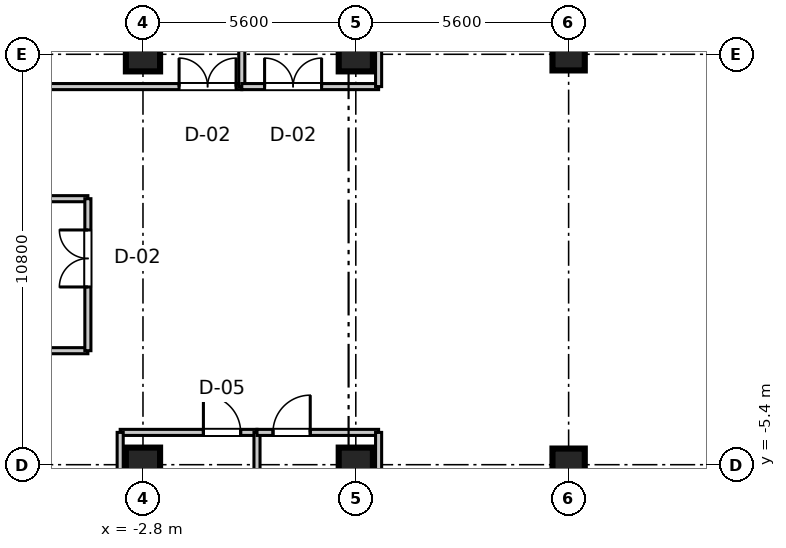
"""IFC4 building model, lengths in metres.
Left out: names, types, materials, properties, quantities, classifications, styles, units other than length and angle.
Written with IfcOpenShell. Run it as: python <this file> out.ifc"""

import sys

from ifc_helpers import new_model, si_unit, direction, frame, frame_2d, origin, origin_2d, place, context, subcontext, project, spatial, rectangle, extrude, source, transform, mapped, element, fill, save


model = new_model("IFC4")
c1 = context("Model", 3, precision=1e-05, world=origin(), true_north=direction((0.0, 1.0)))
c2 = subcontext(c1, "Body", "Model", "MODEL_VIEW")
j1 = project(units=[si_unit("LENGTHUNIT", "METRE"), si_unit("PLANEANGLEUNIT", "RADIAN")], contexts=[c1])
p1 = place(None, origin())
s1 = spatial("IfcSite", under=j1, at=p1, CompositionType="ELEMENT")
p2 = place(p1, origin())
s2 = spatial("IfcBuilding", under=s1, at=p2, CompositionType="ELEMENT")
p3 = place(p2, frame((0.0, 0.0, 343.05)))
s3 = spatial("IfcBuildingStorey", under=s2, at=p3, CompositionType="ELEMENT", Elevation=343.05)
m1 = source(origin(), c2, "Body", "SweptSolid", [
    extrude(rectangle(XDim=0.9, YDim=0.9, at=origin_2d()), origin(), (0.0, 0.0, 1.0), 4.455),
])
for number, where, z_axis, x_axis in (
    (1, (-2.8, -5.4, 0.0), (0.0, 0.0, 1.0), (1.0, 0.0, 0.0)),
    (2, (-2.8, 5.4, 0.0), (0.0, 0.0, 1.0), (1.0, 0.0, 0.0)),
    (3, (2.8, -5.4, 0.0), (0.0, 0.0, 1.0), (1.0, 0.0, 0.0)),
    (4, (2.8, 5.4, 0.0), (0.0, 0.0, 1.0), (1.0, 0.0, 0.0)),
):
    element("IfcColumn", number, at=place(p3, frame(where, z_axis=z_axis, x_axis=x_axis)), inside=s3, PredefinedType="COLUMN", context=c2, shape_type="MappedRepresentation", body=[
        mapped(m1, transform((0.0, 0.0, 0.0), scale=1.0)),
    ])
m2 = source(origin(), c2, "Body", "SweptSolid", [
    extrude(rectangle(XDim=0.85, YDim=0.85, at=origin_2d()), origin(), (0.0, 0.0, 1.0), 4.455),
])
for number, where, z_axis, x_axis in (
    (5, (8.4, -5.4, 0.0), (0.0, 0.0, 1.0), (1.0, 0.0, 0.0)),
    (6, (8.4, 5.4, 0.0), (0.0, 0.0, 1.0), (1.0, 0.0, 0.0)),
):
    element("IfcColumn", number, at=place(p3, frame(where, z_axis=z_axis, x_axis=x_axis)), inside=s3, PredefinedType="PILASTER", context=c2, shape_type="MappedRepresentation", body=[
        mapped(m2, transform((0.0, 0.0, 0.0), scale=1.0)),
    ])
m3 = source(origin(), c2, "Body", "SweptSolid", [
    extrude(rectangle(XDim=18.25, YDim=0.16, at=frame_2d((9.125, 0.0))), origin(), (0.0, 0.0, 1.0), 3.4),
])
for number, where, z_axis, x_axis in (
    (7, (-22.5, -2.4, 0.0), (0.0, 0.0, 1.0), (1.0, 0.0, 0.0)),
    (8, (-22.5, 1.6, 0.0), (0.0, 0.0, 1.0), (1.0, 0.0, 0.0)),
):
    element("IfcWall", number, at=place(p3, frame(where, z_axis=z_axis, x_axis=x_axis)), inside=s3, PredefinedType="PARTITIONING", context=c2, shape_type="MappedRepresentation", body=[
        mapped(m3, transform((0.0, 0.0, 0.0), scale=1.0)),
    ])
m4 = source(origin(), c2, "Body", "SweptSolid", [
    extrude(rectangle(XDim=4.0, YDim=0.16, at=frame_2d((2.0, 0.0))), origin(), (0.0, 0.0, 1.0), 3.4),
])
p4 = place(p3, frame((-4.25, -2.4, 0.0), z_axis=(0.0, 0.0, 1.0), x_axis=(0.0, 1.0, 0.0)))
e9 = element("IfcWall", 9, at=p4, inside=s3, PredefinedType="PARTITIONING", context=c2, shape_type="MappedRepresentation", body=[
    mapped(m4, transform((0.0, 0.0, 0.0), scale=1.0)),
])
p5 = place(p4, frame((1.677, 0.0, 0.0)))
e10 = element("IfcOpeningElement", 10, at=p5, cuts=e9, PredefinedType="OPENING", context=c2, shape_type="SweptSolid", body=[
    extrude(rectangle(XDim=1.5, YDim=2.15, at=frame_2d((0.75, 1.075))), frame((0.0, 0.09, 0.0), z_axis=(0.0, -1.0, 0.0), x_axis=(1.0, 0.0, 0.0)), (0.0, 0.0, 1.0), 0.18),
])
m5 = source(origin(), c2, "Body", "SweptSolid", [
    extrude(rectangle(XDim=22.3, YDim=0.16, at=frame_2d((11.15, 0.0))), origin(), (0.0, 0.0, 1.0), 3.4),
])
p6 = place(p3, frame((-22.5, 4.55, 0.0), z_axis=(0.0, 0.0, 1.0), x_axis=(1.0, 0.0, 0.0)))
e11 = element("IfcWall", 11, at=p6, inside=s3, PredefinedType="PARTITIONING", context=c2, shape_type="MappedRepresentation", body=[
    mapped(m5, transform((0.0, 0.0, 0.0), scale=1.0)),
])
p7 = place(p6, frame((20.65, 0.0, 0.0)))
e12 = element("IfcOpeningElement", 12, at=p7, cuts=e11, PredefinedType="OPENING", context=c2, shape_type="SweptSolid", body=[
    extrude(rectangle(XDim=1.5, YDim=2.15, at=frame_2d((0.75, 1.075))), frame((0.0, 0.09, 0.0), z_axis=(0.0, -1.0, 0.0), x_axis=(1.0, 0.0, 0.0)), (0.0, 0.0, 1.0), 0.18),
])
m6 = source(origin(), c2, "Body", "SweptSolid", [
    extrude(rectangle(XDim=17.95, YDim=0.16, at=frame_2d((8.975, 0.0))), origin(), (0.0, 0.0, 1.0), 3.4),
])
p8 = place(p3, frame((-0.2, 4.55, 0.0), z_axis=(0.0, 0.0, 1.0), x_axis=(0.0, 1.0, 0.0)))
e13 = element("IfcWall", 13, at=p8, inside=s3, PredefinedType="PARTITIONING", context=c2, shape_type="MappedRepresentation", body=[
    mapped(m6, transform((0.0, 0.0, 0.0), scale=1.0)),
])
m7 = source(origin(), c2, "Body", "SweptSolid", [
    extrude(rectangle(XDim=3.6, YDim=0.16, at=frame_2d((1.8, 0.0))), origin(), (0.0, 0.0, 1.0), 3.4),
])
p9 = place(p3, frame((-0.2, 4.55, 0.0), z_axis=(0.0, 0.0, 1.0), x_axis=(1.0, 0.0, 0.0)))
e14 = element("IfcWall", 14, at=p9, inside=s3, PredefinedType="PARTITIONING", context=c2, shape_type="MappedRepresentation", body=[
    mapped(m7, transform((0.0, 0.0, 0.0), scale=1.0)),
])
p10 = place(p9, frame((0.6, 0.0, 0.0)))
e15 = element("IfcOpeningElement", 15, at=p10, cuts=e14, PredefinedType="OPENING", context=c2, shape_type="SweptSolid", body=[
    extrude(rectangle(XDim=1.5, YDim=2.15, at=frame_2d((0.75, 1.075))), frame((0.0, 0.09, 0.0), z_axis=(0.0, -1.0, 0.0), x_axis=(1.0, 0.0, 0.0)), (0.0, 0.0, 1.0), 0.18),
])
p11 = place(p3, frame((3.4, 4.55, 0.0), z_axis=(0.0, 0.0, 1.0), x_axis=(0.0, 1.0, 0.0)))
e16 = element("IfcWall", 16, at=p11, inside=s3, PredefinedType="PARTITIONING", context=c2, shape_type="MappedRepresentation", body=[
    mapped(m6, transform((0.0, 0.0, 0.0), scale=1.0)),
])
p12 = place(p3, frame((-3.4, -4.55, 0.0), z_axis=(0.0, 0.0, 1.0), x_axis=(1.0, 0.0, 0.0)))
e17 = element("IfcWall", 17, at=p12, inside=s3, PredefinedType="PARTITIONING", context=c2, shape_type="MappedRepresentation", body=[
    mapped(m7, transform((0.0, 0.0, 0.0), scale=1.0)),
])
p13 = place(p12, frame((2.19, 0.0, 0.0)))
e18 = element("IfcOpeningElement", 18, at=p13, cuts=e17, PredefinedType="OPENING", context=c2, shape_type="SweptSolid", body=[
    extrude(rectangle(XDim=0.98, YDim=2.1, at=frame_2d((0.49, 1.05))), frame((0.0, 0.09, 0.0), z_axis=(0.0, -1.0, 0.0), x_axis=(1.0, 0.0, 0.0)), (0.0, 0.0, 1.0), 0.18),
])
m8 = source(origin(), c2, "Body", "SweptSolid", [
    extrude(rectangle(XDim=7.45, YDim=0.16, at=frame_2d((3.725, 0.0))), origin(), (0.0, 0.0, 1.0), 3.4),
])
for number, where, z_axis, x_axis in (
    (19, (-3.4, -12.0, 0.0), (0.0, 0.0, 1.0), (0.0, 1.0, 0.0)),
    (20, (0.2, -12.0, 0.0), (0.0, 0.0, 1.0), (0.0, 1.0, 0.0)),
):
    element("IfcWall", number, at=place(p3, frame(where, z_axis=z_axis, x_axis=x_axis)), inside=s3, PredefinedType="PARTITIONING", context=c2, shape_type="MappedRepresentation", body=[
        mapped(m8, transform((0.0, 0.0, 0.0), scale=1.0)),
    ])
m9 = source(origin(), c2, "Body", "SweptSolid", [
    extrude(rectangle(XDim=3.2, YDim=0.16, at=frame_2d((1.6, 0.0))), origin(), (0.0, 0.0, 1.0), 3.4),
])
p14 = place(p3, frame((0.2, -4.55, 0.0), z_axis=(0.0, 0.0, 1.0), x_axis=(1.0, 0.0, 0.0)))
e21 = element("IfcWall", 21, at=p14, inside=s3, PredefinedType="PARTITIONING", context=c2, shape_type="MappedRepresentation", body=[
    mapped(m9, transform((0.0, 0.0, 0.0), scale=1.0)),
])
p15 = place(p14, frame((0.421, 0.0, 0.0)))
e22 = element("IfcOpeningElement", 22, at=p15, cuts=e21, PredefinedType="OPENING", context=c2, shape_type="SweptSolid", body=[
    extrude(rectangle(XDim=0.98, YDim=2.1, at=frame_2d((0.49, 1.05))), frame((0.0, 0.09, 0.0), z_axis=(0.0, -1.0, 0.0), x_axis=(1.0, 0.0, 0.0)), (0.0, 0.0, 1.0), 0.18),
])
m10 = source(origin(), c2, "Body", "SweptSolid", [
    extrude(rectangle(XDim=6.45, YDim=0.16, at=frame_2d((3.225, 0.0))), origin(), (0.0, 0.0, 1.0), 3.4),
])
p16 = place(p3, frame((3.4, -11.0, 0.0), z_axis=(0.0, 0.0, 1.0), x_axis=(0.0, 1.0, 0.0)))
e23 = element("IfcWall", 23, at=p16, inside=s3, PredefinedType="PARTITIONING", context=c2, shape_type="MappedRepresentation", body=[
    mapped(m10, transform((0.0, 0.0, 0.0), scale=1.0)),
])
m11 = source(origin(), c2, "Body", "SweptSolid", [
    extrude(rectangle(XDim=1.5, YDim=2.15, at=frame_2d((0.75, 1.075))), frame((0.0, 0.025, 0.0), z_axis=(0.0, -1.0, 0.0), x_axis=(1.0, 0.0, 0.0)), (0.0, 0.0, 1.0), 0.05),
])
p17 = place(p5, origin())
e24 = element("IfcDoor", 24, at=p17, inside=s3, OperationType="DOUBLE_DOOR_SINGLE_SWING", PredefinedType="DOOR", context=c2, shape_type="MappedRepresentation", body=[
    mapped(m11, transform((0.0, 0.0, 0.0), scale=1.0)),
])
fill(e10, e24)
p18 = place(p7, origin())
e25 = element("IfcDoor", 25, at=p18, inside=s3, OperationType="DOUBLE_DOOR_SINGLE_SWING", PredefinedType="DOOR", context=c2, shape_type="MappedRepresentation", body=[
    mapped(m11, transform((0.0, 0.0, 0.0), scale=1.0)),
])
fill(e12, e25)
p19 = place(p10, origin())
e26 = element("IfcDoor", 26, at=p19, inside=s3, OperationType="DOUBLE_DOOR_SINGLE_SWING", PredefinedType="DOOR", context=c2, shape_type="MappedRepresentation", body=[
    mapped(m11, transform((0.0, 0.0, 0.0), scale=1.0)),
])
fill(e15, e26)
m12 = source(origin(), c2, "Body", "SweptSolid", [
    extrude(rectangle(XDim=0.98, YDim=2.1, at=frame_2d((0.49, 1.05))), frame((0.0, 0.025, 0.0), z_axis=(0.0, -1.0, 0.0), x_axis=(1.0, 0.0, 0.0)), (0.0, 0.0, 1.0), 0.05),
])
p20 = place(p13, frame((0.98, 0.0, 0.0), z_axis=(0.0, 0.0, 1.0), x_axis=(-1.0, 0.0, 0.0)))
e27 = element("IfcDoor", 27, at=p20, inside=s3, OperationType="SINGLE_SWING_LEFT", PredefinedType="DOOR", context=c2, shape_type="MappedRepresentation", body=[
    mapped(m12, transform((0.0, 0.0, 0.0), scale=1.0)),
])
fill(e18, e27)
p21 = place(p15, frame((0.98, 0.0, 0.0), z_axis=(0.0, 0.0, 1.0), x_axis=(-1.0, 0.0, 0.0)))
e28 = element("IfcDoor", 28, at=p21, inside=s3, OperationType="SINGLE_SWING_RIGHT", PredefinedType="DOOR", context=c2, shape_type="MappedRepresentation", body=[
    mapped(m12, transform((0.0, 0.0, 0.0), scale=1.0)),
])
fill(e22, e28)
save(model, sys.argv[1])
